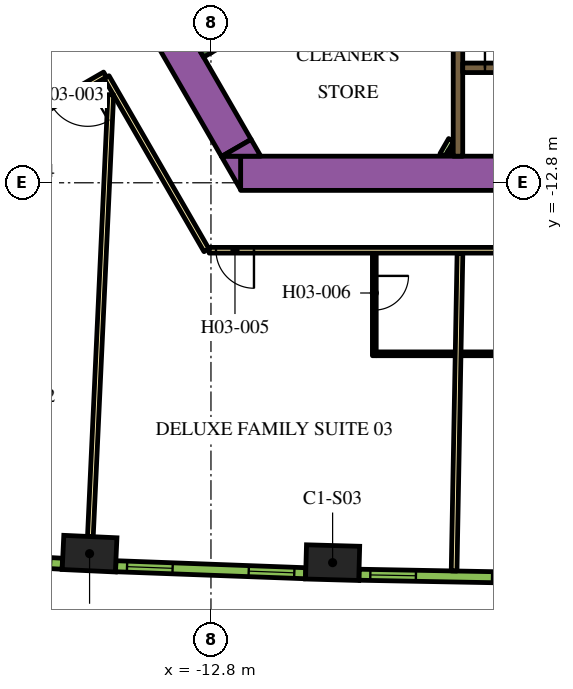
"""IFC4 building model, lengths in metres.
Left out: names, types, materials, properties, quantities, classifications, styles, units other than length and angle.
Written with IfcOpenShell. Run it as: python <this file> out.ifc"""

import sys

from ifc_helpers import new_model, si_unit, direction, frame, frame_2d, origin, origin_2d, place, context, subcontext, project, spatial, polyline, rectangle, outline, extrude, element, fill, save


model = new_model("IFC4")
c1 = context("Model", 3, precision=1e-05, world=origin(), true_north=direction((0.0, 1.0)))
c2 = subcontext(c1, "Body", "Model", "MODEL_VIEW")
j1 = project(units=[si_unit("LENGTHUNIT", "METRE"), si_unit("PLANEANGLEUNIT", "RADIAN")], contexts=[c1])
p1 = place(None, origin())
s1 = spatial("IfcSite", under=j1, at=p1, CompositionType="ELEMENT")
p2 = place(p1, origin())
s2 = spatial("IfcBuilding", under=s1, at=p2, CompositionType="ELEMENT")
p3 = place(p2, frame((0.0, 0.0, 54.9)))
s3 = spatial("IfcBuildingStorey", under=s2, at=p3, CompositionType="ELEMENT", Elevation=54.9)
for number, where, z_axis, x_axis in (
    (1, (-15.994, -22.558, 0.0), (0.0, 0.0, 1.0), (0.999, -0.046, 0.0)),
    (2, (-9.599, -22.795, 0.0), (0.0, 0.0, 1.0), (1.0, -0.028, 0.0)),
):
    element("IfcColumn", number, at=place(p3, frame(where, z_axis=z_axis, x_axis=x_axis)), inside=s3, PredefinedType="COLUMN", context=c2, shape_type="SweptSolid", body=[
        extrude(rectangle(XDim=1.4, YDim=0.9, at=origin_2d()), origin(), (0.0, 0.0, 1.0), 3.9),
    ])
p4 = place(p3, frame((-12.019, -12.55, 0.0), z_axis=(0.0, 0.0, 1.0), x_axis=(1.0, 0.0, 0.0)))
e3 = element("IfcWall", 3, at=p4, inside=s3, PredefinedType="SOLIDWALL", context=c2, shape_type="SweptSolid", body=[
    extrude(rectangle(XDim=21.63, YDim=0.9, at=frame_2d((10.815, 0.0))), origin(), (0.0, 0.0, 1.0), 3.9),
])
p5 = place(p3, origin())
e4 = element("IfcWall", 4, at=p5, inside=s3, PredefinedType="SOLIDWALL", context=c2, shape_type="SweptSolid", body=[
    extrude(outline(polyline([(-12.529, -12.1), (-12.021, -12.1), (-12.021, -12.98), (-12.529, -12.1)])), origin(), (0.0, 0.0, 1.0), 3.9),
])
p6 = place(p3, frame((-12.134, -11.883, 0.0), z_axis=(0.0, 0.0, 1.0), x_axis=(-0.500005339912, 0.866022320763, 0.0)))
e5 = element("IfcWall", 5, at=p6, inside=s3, PredefinedType="SOLIDWALL", context=c2, shape_type="SweptSolid", body=[
    extrude(rectangle(XDim=9.488, YDim=0.9, at=frame_2d((4.744, 0.0))), origin(), (0.0, 0.0, 1.0), 3.9),
])
e6 = element("IfcWall", 6, at=p5, inside=s3, PredefinedType="SOLIDWALL", context=c2, shape_type="SweptSolid", body=[
    extrude(outline(polyline([(-11.489, -12.1), (-12.505, -12.1), (-11.743, -11.66), (-11.489, -12.1)])), origin(), (0.0, 0.0, 1.0), 3.9),
])
p7 = place(p3, frame((-12.885, -9.431, 0.0), z_axis=(0.0, 0.0, 1.0), x_axis=(-0.500020560727, 0.866013532718, 0.0)))
e7 = element("IfcWall", 7, at=p7, inside=s3, PredefinedType="SOLIDWALL", context=c2, shape_type="SweptSolid", body=[
    extrude(rectangle(XDim=3.45, YDim=0.25, at=frame_2d((1.725, 0.0))), origin(), (0.0, 0.0, 1.0), 3.9),
])
p8 = place(p3, frame((-12.84, -9.261, 0.0), z_axis=(0.0, 0.0, 1.0), x_axis=(0.866016039709, 0.500016218704, 0.0)))
e8 = element("IfcWall", 8, at=p8, inside=s3, PredefinedType="SOLIDWALL", context=c2, shape_type="SweptSolid", body=[
    extrude(rectangle(XDim=7.05, YDim=0.25, at=frame_2d((3.525, 0.0))), origin(), (0.0, 0.0, 1.0), 3.9),
])
p9 = place(p3, frame((-6.3, -12.1, 0.0), z_axis=(0.0, 0.0, 1.0), x_axis=(0.0, 1.0, 0.0)))
e9 = element("IfcWall", 9, at=p9, inside=s3, PredefinedType="SOLIDWALL", context=c2, shape_type="SweptSolid", body=[
    extrude(rectangle(XDim=3.146, YDim=0.25, at=frame_2d((1.573, 0.0))), origin(), (0.0, 0.0, 1.0), 3.9),
])
p10 = place(p3, frame((-6.708, -12.068, 0.0), z_axis=(0.0, 0.0, 1.0), x_axis=(0.500000789788, 0.8660249478, 0.0)))
e10 = element("IfcWall", 10, at=p10, inside=s3, PredefinedType="PARTITIONING", context=c2, shape_type="SweptSolid", body=[
    extrude(rectangle(XDim=0.456, YDim=0.15, at=frame_2d((0.228, 0.0))), origin(), (0.0, 0.0, 1.0), 2.75),
])
p11 = place(p3, frame((-6.534, -12.068, 0.0), z_axis=(0.0, 0.0, 1.0), x_axis=(0.500240224089, 0.865886665912, 0.0)))
e11 = element("IfcWall", 11, at=p11, inside=s3, PredefinedType="PARTITIONING", context=c2, shape_type="SweptSolid", body=[
    extrude(rectangle(XDim=0.109, YDim=0.15, at=frame_2d((0.054, 0.0))), origin(), (0.0, 0.0, 1.0), 2.75),
])
p12 = place(p3, frame((-6.175, -9.775, 0.0), z_axis=(0.0, 0.0, 1.0), x_axis=(1.0, 0.0, 0.0)))
e12 = element("IfcWall", 12, at=p12, inside=s3, PredefinedType="SOLIDWALL", context=c2, shape_type="SweptSolid", body=[
    extrude(rectangle(XDim=12.35, YDim=0.25, at=frame_2d((6.175, 0.0))), origin(), (0.0, 0.0, 1.0), 3.9),
])
p13 = place(p12, frame((0.585, 0.0, 0.0)))
e13 = element("IfcOpeningElement", 13, at=p13, cuts=e12, PredefinedType="OPENING", context=c2, shape_type="SweptSolid", body=[
    extrude(rectangle(XDim=1.1, YDim=2.1, at=frame_2d((0.55, 1.05))), frame((0.0, 0.135, 0.0), z_axis=(0.0, -1.0, 0.0), x_axis=(1.0, 0.0, 0.0)), (0.0, 0.0, 1.0), 0.27),
])
p14 = place(p12, frame((3.105, 0.0, 0.0)))
e14 = element("IfcOpeningElement", 14, at=p14, cuts=e12, PredefinedType="OPENING", context=c2, shape_type="SweptSolid", body=[
    extrude(rectangle(XDim=1.1, YDim=2.1, at=frame_2d((0.55, 1.05))), frame((0.0, 0.135, 0.0), z_axis=(0.0, -1.0, 0.0), x_axis=(1.0, 0.0, 0.0)), (0.0, 0.0, 1.0), 0.27),
])
p15 = place(p12, frame((5.625, 0.0, 0.0)))
e15 = element("IfcOpeningElement", 15, at=p15, cuts=e12, PredefinedType="OPENING", context=c2, shape_type="SweptSolid", body=[
    extrude(rectangle(XDim=1.1, YDim=2.1, at=frame_2d((0.55, 1.05))), frame((0.0, 0.135, 0.0), z_axis=(0.0, -1.0, 0.0), x_axis=(1.0, 0.0, 0.0)), (0.0, 0.0, 1.0), 0.27),
])
p16 = place(p12, frame((8.145, 0.0, 0.0)))
e16 = element("IfcOpeningElement", 16, at=p16, cuts=e12, PredefinedType="OPENING", context=c2, shape_type="SweptSolid", body=[
    extrude(rectangle(XDim=1.1, YDim=2.1, at=frame_2d((0.55, 1.05))), frame((0.0, 0.135, 0.0), z_axis=(0.0, -1.0, 0.0), x_axis=(1.0, 0.0, 0.0)), (0.0, 0.0, 1.0), 0.27),
])
p17 = place(p12, frame((10.665, 0.0, 0.0)))
e17 = element("IfcOpeningElement", 17, at=p17, cuts=e12, PredefinedType="OPENING", context=c2, shape_type="SweptSolid", body=[
    extrude(rectangle(XDim=1.1, YDim=2.1, at=frame_2d((0.55, 1.05))), frame((0.0, 0.135, 0.0), z_axis=(0.0, -1.0, 0.0), x_axis=(1.0, 0.0, 0.0)), (0.0, 0.0, 1.0), 0.27),
])
p18 = place(p3, frame((-30.463, -16.635, 0.0), z_axis=(0.0, 0.0, 1.0), x_axis=(0.866022394896, 0.500005211512, 0.0)))
e18 = element("IfcWall", 18, at=p18, inside=s3, PredefinedType="PARTITIONING", context=c2, shape_type="SweptSolid", body=[
    extrude(rectangle(XDim=16.144, YDim=0.15, at=frame_2d((8.072, 0.0))), origin(), (0.0, 0.0, 1.0), 2.75),
])
p19 = place(p18, frame((11.004, 0.0, 0.0)))
e19 = element("IfcOpeningElement", 19, at=p19, cuts=e18, PredefinedType="OPENING", context=c2, shape_type="SweptSolid", body=[
    extrude(rectangle(XDim=1.0, YDim=2.1, at=frame_2d((0.5, 1.05))), frame((0.0, 0.085, 0.0), z_axis=(0.0, -1.0, 0.0), x_axis=(1.0, 0.0, 0.0)), (0.0, 0.0, 1.0), 0.17),
])
p20 = place(p18, frame((7.274, 0.0, 0.0)))
e20 = element("IfcOpeningElement", 20, at=p20, cuts=e18, PredefinedType="OPENING", context=c2, shape_type="SweptSolid", body=[
    extrude(rectangle(XDim=1.0, YDim=2.1, at=frame_2d((0.5, 1.05))), frame((0.0, 0.085, 0.0), z_axis=(0.0, -1.0, 0.0), x_axis=(1.0, 0.0, 0.0)), (0.0, 0.0, 1.0), 0.17),
])
p21 = place(p3, frame((-15.587, -9.952, 0.0), z_axis=(0.0, 0.0, 1.0), x_axis=(-0.866022197818, -0.500005552856, 0.0)))
e21 = element("IfcWall", 21, at=p21, inside=s3, PredefinedType="PARTITIONING", context=c2, shape_type="SweptSolid", body=[
    extrude(rectangle(XDim=16.224, YDim=0.15, at=frame_2d((8.112, 0.0))), origin(), (0.0, 0.0, 1.0), 2.75),
])
p22 = place(p21, frame((7.949, 0.0, 0.0)))
e22 = element("IfcOpeningElement", 22, at=p22, cuts=e21, PredefinedType="OPENING", context=c2, shape_type="SweptSolid", body=[
    extrude(rectangle(XDim=1.0, YDim=2.1, at=frame_2d((0.5, 1.05))), frame((0.0, 0.085, 0.0), z_axis=(0.0, -1.0, 0.0), x_axis=(1.0, 0.0, 0.0)), (0.0, 0.0, 1.0), 0.17),
])
p23 = place(p21, frame((0.525, 0.0, 0.0)))
e23 = element("IfcOpeningElement", 23, at=p23, cuts=e21, PredefinedType="OPENING", context=c2, shape_type="SweptSolid", body=[
    extrude(rectangle(XDim=1.1, YDim=2.1, at=frame_2d((0.55, 1.05))), frame((0.0, 0.085, 0.0), z_axis=(0.0, -1.0, 0.0), x_axis=(1.0, 0.0, 0.0)), (0.0, 0.0, 1.0), 0.17),
])
p24 = place(p3, frame((-12.918, -14.575, 0.0), z_axis=(0.0, 0.0, 1.0), x_axis=(-0.500009150678, 0.866020120573, 0.0)))
e24 = element("IfcWall", 24, at=p24, inside=s3, PredefinedType="PARTITIONING", context=c2, shape_type="SweptSolid", body=[
    extrude(rectangle(XDim=5.258, YDim=0.15, at=frame_2d((2.629, 0.0))), origin(), (0.0, 0.0, 1.0), 2.75),
])
p25 = place(p3, frame((12.918, -14.575, 0.0), z_axis=(0.0, 0.0, 1.0), x_axis=(-1.0, 0.0, 0.0)))
e25 = element("IfcWall", 25, at=p25, inside=s3, PredefinedType="PARTITIONING", context=c2, shape_type="SweptSolid", body=[
    extrude(rectangle(XDim=25.766, YDim=0.15, at=frame_2d((12.883, 0.0))), origin(), (0.0, 0.0, 1.0), 2.75),
])
p26 = place(p25, frame((24.586, 0.0, 0.0)))
e26 = element("IfcOpeningElement", 26, at=p26, cuts=e25, PredefinedType="OPENING", context=c2, shape_type="SweptSolid", body=[
    extrude(rectangle(XDim=1.0, YDim=2.1, at=frame_2d((0.5, 1.05))), frame((0.0, 0.085, 0.0), z_axis=(0.0, -1.0, 0.0), x_axis=(1.0, 0.0, 0.0)), (0.0, 0.0, 1.0), 0.17),
])
p27 = place(p25, frame((9.948, 0.0, 0.0)))
e27 = element("IfcOpeningElement", 27, at=p27, cuts=e25, PredefinedType="OPENING", context=c2, shape_type="SweptSolid", body=[
    extrude(rectangle(XDim=1.0, YDim=2.1, at=frame_2d((0.5, 1.05))), frame((0.0, 0.085, 0.0), z_axis=(0.0, -1.0, 0.0), x_axis=(1.0, 0.0, 0.0)), (0.0, 0.0, 1.0), 0.17),
])
p28 = place(p25, frame((8.642, 0.0, 0.0)))
e28 = element("IfcOpeningElement", 28, at=p28, cuts=e25, PredefinedType="OPENING", context=c2, shape_type="SweptSolid", body=[
    extrude(rectangle(XDim=1.0, YDim=2.1, at=frame_2d((0.5, 1.05))), frame((0.0, 0.085, 0.0), z_axis=(0.0, -1.0, 0.0), x_axis=(1.0, 0.0, 0.0)), (0.0, 0.0, 1.0), 0.17),
])
p29 = place(p25, frame((0.18, 0.0, 0.0)))
e29 = element("IfcOpeningElement", 29, at=p29, cuts=e25, PredefinedType="OPENING", context=c2, shape_type="SweptSolid", body=[
    extrude(rectangle(XDim=1.0, YDim=2.1, at=frame_2d((0.5, 1.05))), frame((0.0, 0.085, 0.0), z_axis=(0.0, -1.0, 0.0), x_axis=(1.0, 0.0, 0.0)), (0.0, 0.0, 1.0), 0.17),
])
p30 = place(p3, frame((-15.973, -22.109, 0.0), z_axis=(0.0, 0.0, 1.0), x_axis=(0.046191717129, 0.998932592955, 0.0)))
e30 = element("IfcWall", 30, at=p30, inside=s3, PredefinedType="PARTITIONING", context=c2, shape_type="SweptSolid", body=[
    extrude(rectangle(XDim=11.638, YDim=0.15, at=frame_2d((5.819, 0.0))), origin(), (0.0, 0.0, 1.0), 2.75),
])
p31 = place(p3, frame((-6.402, -23.014, 0.0), z_axis=(0.0, 0.0, 1.0), x_axis=(0.01849587109, 0.999828936745, 0.0)))
e31 = element("IfcWall", 31, at=p31, inside=s3, PredefinedType="PARTITIONING", context=c2, shape_type="SweptSolid", body=[
    extrude(rectangle(XDim=8.355, YDim=0.15, at=frame_2d((4.178, 0.0))), origin(), (0.0, 0.0, 1.0), 2.75),
])
p32 = place(p3, frame((-8.502, -14.65, 0.0), z_axis=(0.0, 0.0, 1.0), x_axis=(0.0, -1.0, 0.0)))
e32 = element("IfcWall", 32, at=p32, inside=s3, PredefinedType="PARTITIONING", context=c2, shape_type="SweptSolid", body=[
    extrude(rectangle(XDim=2.7, YDim=0.1, at=frame_2d((1.35, 0.0))), origin(), (0.0, 0.0, 1.0), 2.75),
])
p33 = place(p32, frame((0.6, 0.0, 0.0)))
e33 = element("IfcOpeningElement", 33, at=p33, cuts=e32, PredefinedType="OPENING", context=c2, shape_type="SweptSolid", body=[
    extrude(rectangle(XDim=0.9, YDim=2.1, at=frame_2d((0.45, 1.05))), frame((0.0, 0.06, 0.0), z_axis=(0.0, -1.0, 0.0), x_axis=(1.0, 0.0, 0.0)), (0.0, 0.0, 1.0), 0.12),
])
p34 = place(p3, frame((-8.452, -17.3, 0.0), z_axis=(0.0, 0.0, 1.0), x_axis=(1.0, 0.0, 0.0)))
e34 = element("IfcWall", 34, at=p34, inside=s3, PredefinedType="PARTITIONING", context=c2, shape_type="SweptSolid", body=[
    extrude(rectangle(XDim=2.07, YDim=0.1, at=frame_2d((1.035, 0.0))), origin(), (0.0, 0.0, 1.0), 2.75),
])
p35 = place(p3, frame((-4.044, -17.3, 0.0), z_axis=(0.0, 0.0, 1.0), x_axis=(-1.0, 0.0, 0.0)))
e35 = element("IfcWall", 35, at=p35, inside=s3, PredefinedType="PARTITIONING", context=c2, shape_type="SweptSolid", body=[
    extrude(rectangle(XDim=2.17, YDim=0.1, at=frame_2d((1.085, 0.0))), origin(), (0.0, 0.0, 1.0), 2.75),
])
p36 = place(p3, frame((-21.701, -22.547, 0.0), z_axis=(0.0, 0.0, 1.0), x_axis=(0.998464708705, -0.055391564976, 0.0)))
e36 = element("IfcWall", 36, at=p36, inside=s3, PredefinedType="SOLIDWALL", context=c2, shape_type="SweptSolid", body=[
    extrude(rectangle(XDim=4.998, YDim=0.29, at=frame_2d((2.499, 0.0))), origin(), (0.0, 0.0, 1.0), 3.65),
])
p37 = place(p36, frame((0.297, 0.0, 0.9)))
e37 = element("IfcOpeningElement", 37, at=p37, cuts=e36, PredefinedType="OPENING", context=c2, shape_type="SweptSolid", body=[
    extrude(rectangle(XDim=1.2, YDim=2.15, at=frame_2d((0.6, 1.075))), frame((0.0, 0.155, 0.0), z_axis=(0.0, -1.0, 0.0), x_axis=(1.0, 0.0, 0.0)), (0.0, 0.0, 1.0), 0.31),
])
p38 = place(p36, frame((3.501, 0.0, 0.9)))
e38 = element("IfcOpeningElement", 38, at=p38, cuts=e36, PredefinedType="OPENING", context=c2, shape_type="SweptSolid", body=[
    extrude(rectangle(XDim=1.2, YDim=2.15, at=frame_2d((0.6, 1.075))), frame((0.0, 0.155, 0.0), z_axis=(0.0, -1.0, 0.0), x_axis=(1.0, 0.0, 0.0)), (0.0, 0.0, 1.0), 0.31),
])
p39 = place(p3, frame((-15.305, -22.889, 0.0), z_axis=(0.0, 0.0, 1.0), x_axis=(0.999317974969, -0.036926750529, 0.0)))
e39 = element("IfcWall", 39, at=p39, inside=s3, PredefinedType="SOLIDWALL", context=c2, shape_type="SweptSolid", body=[
    extrude(rectangle(XDim=4.998, YDim=0.29, at=frame_2d((2.499, 0.0))), origin(), (0.0, 0.0, 1.0), 3.65),
])
p40 = place(p39, frame((0.297, 0.0, 0.9)))
e40 = element("IfcOpeningElement", 40, at=p40, cuts=e39, PredefinedType="OPENING", context=c2, shape_type="SweptSolid", body=[
    extrude(rectangle(XDim=1.2, YDim=2.15, at=frame_2d((0.6, 1.075))), frame((0.0, 0.155, 0.0), z_axis=(0.0, -1.0, 0.0), x_axis=(1.0, 0.0, 0.0)), (0.0, 0.0, 1.0), 0.31),
])
p41 = place(p39, frame((3.501, 0.0, 0.9)))
e41 = element("IfcOpeningElement", 41, at=p41, cuts=e39, PredefinedType="OPENING", context=c2, shape_type="SweptSolid", body=[
    extrude(rectangle(XDim=1.2, YDim=2.15, at=frame_2d((0.6, 1.075))), frame((0.0, 0.155, 0.0), z_axis=(0.0, -1.0, 0.0), x_axis=(1.0, 0.0, 0.0)), (0.0, 0.0, 1.0), 0.31),
])
p42 = place(p3, frame((-8.904, -23.113, 0.0), z_axis=(0.0, 0.0, 1.0), x_axis=(0.999829529479, -0.018463801951, 0.0)))
e42 = element("IfcWall", 42, at=p42, inside=s3, PredefinedType="SOLIDWALL", context=c2, shape_type="SweptSolid", body=[
    extrude(rectangle(XDim=4.998, YDim=0.29, at=frame_2d((2.499, 0.0))), origin(), (0.0, 0.0, 1.0), 3.65),
])
p43 = place(p42, frame((0.297, 0.0, 0.9)))
e43 = element("IfcOpeningElement", 43, at=p43, cuts=e42, PredefinedType="OPENING", context=c2, shape_type="SweptSolid", body=[
    extrude(rectangle(XDim=1.2, YDim=2.15, at=frame_2d((0.6, 1.075))), frame((0.0, 0.155, 0.0), z_axis=(0.0, -1.0, 0.0), x_axis=(1.0, 0.0, 0.0)), (0.0, 0.0, 1.0), 0.31),
])
p44 = place(p42, frame((3.501, 0.0, 0.9)))
e44 = element("IfcOpeningElement", 44, at=p44, cuts=e42, PredefinedType="OPENING", context=c2, shape_type="SweptSolid", body=[
    extrude(rectangle(XDim=1.2, YDim=2.15, at=frame_2d((0.6, 1.075))), frame((0.0, 0.155, 0.0), z_axis=(0.0, -1.0, 0.0), x_axis=(1.0, 0.0, 0.0)), (0.0, 0.0, 1.0), 0.31),
])
p45 = place(p13, origin())
e45 = element("IfcDoor", 45, at=p45, inside=s3, OperationType="DOUBLE_DOOR_SLIDING", PredefinedType="DOOR", context=c2, shape_type="SweptSolid", body=[
    extrude(rectangle(XDim=1.1, YDim=2.1, at=frame_2d((0.55, 1.05))), frame((0.0, 0.025, 0.0), z_axis=(0.0, -1.0, 0.0), x_axis=(1.0, 0.0, 0.0)), (0.0, 0.0, 1.0), 0.05),
])
fill(e13, e45)
p46 = place(p23, origin())
e46 = element("IfcDoor", 46, at=p46, inside=s3, OperationType="SINGLE_SWING_LEFT", PredefinedType="DOOR", context=c2, shape_type="SweptSolid", body=[
    extrude(rectangle(XDim=1.1, YDim=2.1, at=frame_2d((0.55, 1.05))), frame((0.0, 0.025, 0.0), z_axis=(0.0, -1.0, 0.0), x_axis=(1.0, 0.0, 0.0)), (0.0, 0.0, 1.0), 0.05),
])
fill(e23, e46)
p47 = place(p26, origin())
e47 = element("IfcDoor", 47, at=p47, inside=s3, OperationType="SINGLE_SWING_RIGHT", PredefinedType="DOOR", context=c2, shape_type="SweptSolid", body=[
    extrude(rectangle(XDim=1.0, YDim=2.1, at=frame_2d((0.5, 1.05))), frame((0.0, 0.025, 0.0), z_axis=(0.0, -1.0, 0.0), x_axis=(1.0, 0.0, 0.0)), (0.0, 0.0, 1.0), 0.05),
])
fill(e26, e47)
p48 = place(p33, origin())
e48 = element("IfcDoor", 48, at=p48, inside=s3, OperationType="SINGLE_SWING_RIGHT", PredefinedType="DOOR", context=c2, shape_type="SweptSolid", body=[
    extrude(rectangle(XDim=0.9, YDim=2.1, at=frame_2d((0.45, 1.05))), frame((0.0, 0.025, 0.0), z_axis=(0.0, -1.0, 0.0), x_axis=(1.0, 0.0, 0.0)), (0.0, 0.0, 1.0), 0.05),
])
fill(e33, e48)
p49 = place(p40, origin())
e49 = element("IfcWindow", 49, at=p49, inside=s3, PartitioningType="DOUBLE_PANEL_VERTICAL", PredefinedType="WINDOW", context=c2, shape_type="SweptSolid", body=[
    extrude(rectangle(XDim=1.2, YDim=2.15, at=frame_2d((0.6, 1.075))), frame((0.0, 0.015, 0.0), z_axis=(0.0, -1.0, 0.0), x_axis=(1.0, 0.0, 0.0)), (0.0, 0.0, 1.0), 0.06),
])
fill(e40, e49)
p50 = place(p41, origin())
e50 = element("IfcWindow", 50, at=p50, inside=s3, PartitioningType="DOUBLE_PANEL_VERTICAL", PredefinedType="WINDOW", context=c2, shape_type="SweptSolid", body=[
    extrude(rectangle(XDim=1.2, YDim=2.15, at=frame_2d((0.6, 1.075))), frame((0.0, 0.015, 0.0), z_axis=(0.0, -1.0, 0.0), x_axis=(1.0, 0.0, 0.0)), (0.0, 0.0, 1.0), 0.06),
])
fill(e41, e50)
p51 = place(p43, origin())
e51 = element("IfcWindow", 51, at=p51, inside=s3, PartitioningType="DOUBLE_PANEL_VERTICAL", PredefinedType="WINDOW", context=c2, shape_type="SweptSolid", body=[
    extrude(rectangle(XDim=1.2, YDim=2.15, at=frame_2d((0.6, 1.075))), frame((0.0, 0.015, 0.0), z_axis=(0.0, -1.0, 0.0), x_axis=(1.0, 0.0, 0.0)), (0.0, 0.0, 1.0), 0.06),
])
fill(e43, e51)
p52 = place(p44, origin())
e52 = element("IfcWindow", 52, at=p52, inside=s3, PartitioningType="DOUBLE_PANEL_VERTICAL", PredefinedType="WINDOW", context=c2, shape_type="SweptSolid", body=[
    extrude(rectangle(XDim=1.2, YDim=2.15, at=frame_2d((0.6, 1.075))), frame((0.0, 0.015, 0.0), z_axis=(0.0, -1.0, 0.0), x_axis=(1.0, 0.0, 0.0)), (0.0, 0.0, 1.0), 0.06),
])
fill(e44, e52)
save(model, sys.argv[1])
